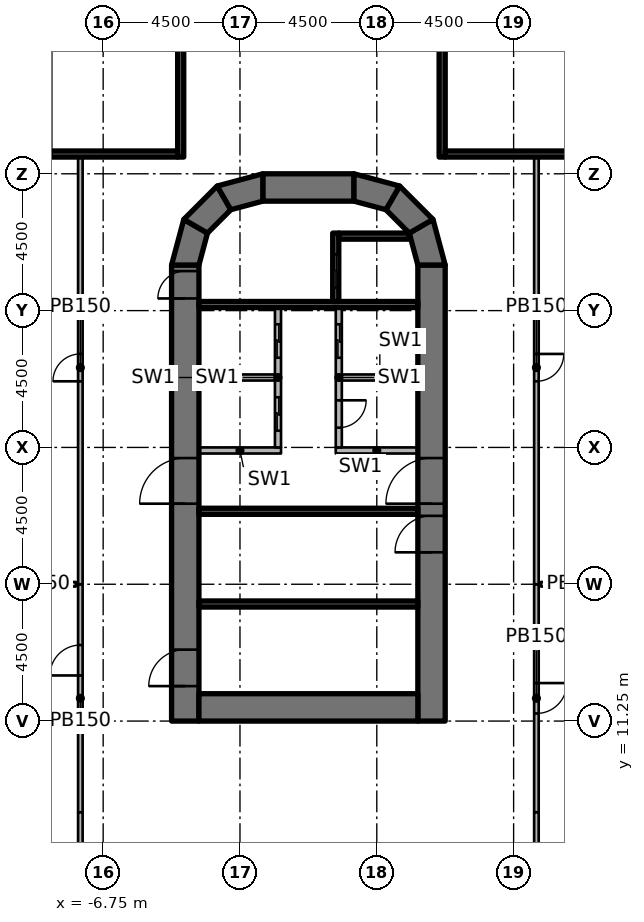
"""IFC4 building model, lengths in metres.
Left out: names, types, materials, properties, quantities, classifications, styles, units other than length and angle.
Written with IfcOpenShell. Run it as: python <this file> out.ifc"""

import sys

from ifc_helpers import new_model, si_unit, direction, frame, frame_2d, origin, origin_2d, place, context, subcontext, project, spatial, polyline, rectangle, outline, extrude, element, fill, save


model = new_model("IFC4")
c1 = context("Model", 3, precision=1e-05, world=origin(), true_north=direction((0.0, 1.0)))
c2 = subcontext(c1, "Body", "Model", "MODEL_VIEW")
j1 = project(units=[si_unit("LENGTHUNIT", "METRE"), si_unit("PLANEANGLEUNIT", "RADIAN")], contexts=[c1])
p1 = place(None, origin())
s1 = spatial("IfcSite", under=j1, at=p1, CompositionType="ELEMENT")
p2 = place(p1, origin())
s2 = spatial("IfcBuilding", under=s1, at=p2, CompositionType="ELEMENT")
p3 = place(p2, frame((0.0, 0.0, 22.0)))
s3 = spatial("IfcBuildingStorey", under=s2, at=p3, CompositionType="ELEMENT", Elevation=22.0)
for number, where, z_axis, x_axis in (
    (1, (-6.25, 10.75, 0.0), (0.0, 0.0, 1.0), (1.0, 0.0, 0.0)),
    (2, (-6.25, 15.75, 0.0), (0.0, 0.0, 1.0), (1.0, 0.0, 0.0)),
    (3, (-6.25, 20.25, 0.0), (0.0, 0.0, 1.0), (1.0, 0.0, 0.0)),
    (4, (-6.25, 24.65, 0.0), (0.0, 0.0, 1.0), (1.0, 0.0, 0.0)),
    (5, (-6.25, 26.7, 0.0), (0.0, 0.0, 1.0), (1.0, 0.0, 0.0)),
    (6, (-2.25, 33.11, 0.0), (0.0, 0.0, 1.0), (1.0, 0.0, 0.0)),
    (7, (2.25, 33.11, 0.0), (0.0, 0.0, 1.0), (1.0, 0.0, 0.0)),
    (8, (6.25, 10.75, 0.0), (0.0, 0.0, 1.0), (1.0, 0.0, 0.0)),
    (9, (6.25, 15.75, 0.0), (0.0, 0.0, 1.0), (1.0, 0.0, 0.0)),
    (10, (6.25, 20.25, 0.0), (0.0, 0.0, 1.0), (1.0, 0.0, 0.0)),
    (11, (6.25, 24.65, 0.0), (0.0, 0.0, 1.0), (1.0, 0.0, 0.0)),
    (12, (6.25, 26.7, 0.0), (0.0, 0.0, 1.0), (1.0, 0.0, 0.0)),
):
    element("IfcColumn", number, at=place(p3, frame(where, z_axis=z_axis, x_axis=x_axis)), inside=s3, PredefinedType="COLUMN", context=c2, shape_type="SweptSolid", body=[
        extrude(rectangle(XDim=1.2, YDim=1.2, at=origin_2d()), origin(), (0.0, 0.0, 1.0), 4.85),
    ])
p4 = place(p3, frame((-4.05, 11.25, 0.0), z_axis=(0.0, 0.0, 1.0), x_axis=(0.0, 1.0, 0.0)))
e13 = element("IfcWall", 13, at=p4, inside=s3, PredefinedType="SHEAR", context=c2, shape_type="SweptSolid", body=[
    extrude(rectangle(XDim=15.0, YDim=0.9, at=frame_2d((7.5, 0.0))), origin(), (0.0, 0.0, 1.0), 5.0),
])
p5 = place(p4, frame((7.15, 0.0, 0.0)))
e14 = element("IfcOpeningElement", 14, at=p5, cuts=e13, PredefinedType="OPENING", context=c2, shape_type="SweptSolid", body=[
    extrude(rectangle(XDim=1.5, YDim=2.3, at=frame_2d((0.75, 1.15))), frame((0.0, 0.46, 0.0), z_axis=(0.0, -1.0, 0.0), x_axis=(1.0, 0.0, 0.0)), (0.0, 0.0, 1.0), 0.92),
])
p6 = place(p4, frame((13.9, 0.0, 0.0)))
e15 = element("IfcOpeningElement", 15, at=p6, cuts=e13, PredefinedType="OPENING", context=c2, shape_type="SweptSolid", body=[
    extrude(rectangle(XDim=0.9, YDim=2.1, at=frame_2d((0.45, 1.05))), frame((0.0, 0.46, 0.0), z_axis=(0.0, -1.0, 0.0), x_axis=(1.0, 0.0, 0.0)), (0.0, 0.0, 1.0), 0.92),
])
p7 = place(p4, frame((1.15, 0.0, 0.0)))
e16 = element("IfcOpeningElement", 16, at=p7, cuts=e13, PredefinedType="OPENING", context=c2, shape_type="SweptSolid", body=[
    extrude(rectangle(XDim=1.2, YDim=2.1, at=frame_2d((0.6, 1.05))), frame((0.0, 0.46, 0.0), z_axis=(0.0, -1.0, 0.0), x_axis=(1.0, 0.0, 0.0)), (0.0, 0.0, 1.0), 0.92),
])
p8 = place(p3, frame((4.05, 11.25, 0.0), z_axis=(0.0, 0.0, 1.0), x_axis=(0.0, 1.0, 0.0)))
e17 = element("IfcWall", 17, at=p8, inside=s3, PredefinedType="SHEAR", context=c2, shape_type="SweptSolid", body=[
    extrude(rectangle(XDim=15.0, YDim=0.9, at=frame_2d((7.5, 0.0))), origin(), (0.0, 0.0, 1.0), 5.0),
])
p9 = place(p8, frame((7.15, 0.0, 0.0)))
e18 = element("IfcOpeningElement", 18, at=p9, cuts=e17, PredefinedType="OPENING", context=c2, shape_type="SweptSolid", body=[
    extrude(rectangle(XDim=1.5, YDim=2.3, at=frame_2d((0.75, 1.15))), frame((0.0, 0.46, 0.0), z_axis=(0.0, -1.0, 0.0), x_axis=(1.0, 0.0, 0.0)), (0.0, 0.0, 1.0), 0.92),
])
p10 = place(p8, frame((5.55, 0.0, 0.0)))
e19 = element("IfcOpeningElement", 19, at=p10, cuts=e17, PredefinedType="OPENING", context=c2, shape_type="SweptSolid", body=[
    extrude(rectangle(XDim=1.2, YDim=2.1, at=frame_2d((0.6, 1.05))), frame((0.0, 0.46, 0.0), z_axis=(0.0, -1.0, 0.0), x_axis=(1.0, 0.0, 0.0)), (0.0, 0.0, 1.0), 0.92),
])
p11 = place(p3, frame((-3.6, 11.7, 0.0), z_axis=(0.0, 0.0, 1.0), x_axis=(1.0, 0.0, 0.0)))
e20 = element("IfcWall", 20, at=p11, inside=s3, PredefinedType="SHEAR", context=c2, shape_type="SweptSolid", body=[
    extrude(rectangle(XDim=7.2, YDim=0.9, at=frame_2d((3.6, 0.0))), origin(), (0.0, 0.0, 1.0), 5.0),
])
p12 = place(p3, frame((-1.5, 28.8, 0.0), z_axis=(0.0, 0.0, 1.0), x_axis=(1.0, 0.0, 0.0)))
e21 = element("IfcWall", 21, at=p12, inside=s3, PredefinedType="SHEAR", context=c2, shape_type="SweptSolid", body=[
    extrude(rectangle(XDim=3.0, YDim=0.9, at=frame_2d((1.5, 0.0))), origin(), (0.0, 0.0, 1.0), 5.0),
])
p13 = place(p3, origin())
e22 = element("IfcWall", 22, at=p13, inside=s3, PredefinedType="SHEAR", context=c2, shape_type="SweptSolid", body=[
    extrude(outline(polyline([(-4.5, 26.25), (-4.098, 27.75), (-3.319, 27.3), (-3.6, 26.25), (-4.5, 26.25)])), origin(), (0.0, 0.0, 1.0), 5.0),
])
p14 = place(p3, origin())
e23 = element("IfcWall", 23, at=p14, inside=s3, PredefinedType="SHEAR", context=c2, shape_type="SweptSolid", body=[
    extrude(outline(polyline([(-4.098, 27.75), (-3.0, 28.848), (-2.55, 28.069), (-3.319, 27.3), (-4.098, 27.75)])), origin(), (0.0, 0.0, 1.0), 5.0),
])
p15 = place(p3, origin())
e24 = element("IfcWall", 24, at=p15, inside=s3, PredefinedType="SHEAR", context=c2, shape_type="SweptSolid", body=[
    extrude(outline(polyline([(-3.0, 28.848), (-1.5, 29.25), (-1.5, 28.35), (-2.55, 28.069), (-3.0, 28.848)])), origin(), (0.0, 0.0, 1.0), 5.0),
])
p16 = place(p3, origin())
e25 = element("IfcWall", 25, at=p16, inside=s3, PredefinedType="SHEAR", context=c2, shape_type="SweptSolid", body=[
    extrude(outline(polyline([(4.5, 26.25), (4.098, 27.75), (3.319, 27.3), (3.6, 26.25), (4.5, 26.25)])), origin(), (0.0, 0.0, 1.0), 5.0),
])
p17 = place(p3, origin())
e26 = element("IfcWall", 26, at=p17, inside=s3, PredefinedType="SHEAR", context=c2, shape_type="SweptSolid", body=[
    extrude(outline(polyline([(4.098, 27.75), (3.0, 28.848), (2.55, 28.069), (3.319, 27.3), (4.098, 27.75)])), origin(), (0.0, 0.0, 1.0), 5.0),
])
p18 = place(p3, origin())
e27 = element("IfcWall", 27, at=p18, inside=s3, PredefinedType="SHEAR", context=c2, shape_type="SweptSolid", body=[
    extrude(outline(polyline([(3.0, 28.848), (1.5, 29.25), (1.5, 28.35), (2.55, 28.069), (3.0, 28.848)])), origin(), (0.0, 0.0, 1.0), 5.0),
])
p19 = place(p3, frame((-3.6, 24.95, 0.0), z_axis=(0.0, 0.0, 1.0), x_axis=(1.0, 0.0, 0.0)))
e28 = element("IfcWall", 28, at=p19, inside=s3, PredefinedType="SHEAR", context=c2, shape_type="SweptSolid", body=[
    extrude(rectangle(XDim=7.2, YDim=0.2, at=frame_2d((3.6, 0.0))), origin(), (0.0, 0.0, 1.0), 4.85),
])
p20 = place(p3, frame((0.9, 27.3, 0.0), z_axis=(0.0, 0.0, 1.0), x_axis=(0.0, -1.0, 0.0)))
e29 = element("IfcWall", 29, at=p20, inside=s3, PredefinedType="SHEAR", context=c2, shape_type="SweptSolid", body=[
    extrude(rectangle(XDim=2.25, YDim=0.2, at=frame_2d((1.125, 0.0))), origin(), (0.0, 0.0, 1.0), 4.85),
])
p21 = place(p20, frame((0.7, 0.0, 0.0)))
e30 = element("IfcOpeningElement", 30, at=p21, cuts=e29, PredefinedType="OPENING", context=c2, shape_type="SweptSolid", body=[
    extrude(rectangle(XDim=1.1, YDim=2.3, at=frame_2d((0.55, 1.15))), frame((0.0, 0.11, 0.0), z_axis=(0.0, -1.0, 0.0), x_axis=(1.0, 0.0, 0.0)), (0.0, 0.0, 1.0), 0.22),
])
p22 = place(p3, origin())
e31 = element("IfcWall", 31, at=p22, inside=s3, PredefinedType="SHEAR", context=c2, shape_type="SweptSolid", body=[
    extrude(outline(polyline([(1.0, 27.1), (3.341, 27.1), (3.291, 27.284), (3.275, 27.3), (1.0, 27.3), (1.0, 27.1)])), origin(), (0.0, 0.0, 1.0), 4.85),
])
for number, where, z_axis, x_axis in (
    (32, (-3.6, 18.15, 0.0), (0.0, 0.0, 1.0), (1.0, 0.0, 0.0)),
    (33, (-3.6, 15.1, 0.0), (0.0, 0.0, 1.0), (1.0, 0.0, 0.0)),
):
    element("IfcWall", number, at=place(p3, frame(where, z_axis=z_axis, x_axis=x_axis)), inside=s3, PredefinedType="SHEAR", context=c2, shape_type="SweptSolid", body=[
        extrude(rectangle(XDim=7.2, YDim=0.2, at=frame_2d((3.6, 0.0))), origin(), (0.0, 0.0, 1.0), 4.85),
    ])
p23 = place(p3, frame((-3.6, 20.15, 0.0), z_axis=(0.0, 0.0, 1.0), x_axis=(1.0, 0.0, 0.0)))
e34 = element("IfcWall", 34, at=p23, inside=s3, PredefinedType="PARTITIONING", context=c2, shape_type="SweptSolid", body=[
    extrude(rectangle(XDim=2.7, YDim=0.2, at=frame_2d((1.35, 0.0))), origin(), (0.0, 0.0, 1.0), 4.85),
])
p24 = place(p3, frame((-1.0, 24.85, 0.0), z_axis=(0.0, 0.0, 1.0), x_axis=(0.0, -1.0, 0.0)))
e35 = element("IfcWall", 35, at=p24, inside=s3, PredefinedType="PARTITIONING", context=c2, shape_type="SweptSolid", body=[
    extrude(rectangle(XDim=4.6, YDim=0.2, at=frame_2d((2.3, 0.0))), origin(), (0.0, 0.0, 1.0), 4.85),
])
p25 = place(p24, frame((0.55, 0.0, 0.0)))
e36 = element("IfcOpeningElement", 36, at=p25, cuts=e35, PredefinedType="OPENING", context=c2, shape_type="SweptSolid", body=[
    extrude(rectangle(XDim=1.1, YDim=2.3, at=frame_2d((0.55, 1.15))), frame((0.0, 0.11, 0.0), z_axis=(0.0, -1.0, 0.0), x_axis=(1.0, 0.0, 0.0)), (0.0, 0.0, 1.0), 0.22),
])
p26 = place(p24, frame((2.95, 0.0, 0.0)))
e37 = element("IfcOpeningElement", 37, at=p26, cuts=e35, PredefinedType="OPENING", context=c2, shape_type="SweptSolid", body=[
    extrude(rectangle(XDim=1.1, YDim=2.3, at=frame_2d((0.55, 1.15))), frame((0.0, 0.11, 0.0), z_axis=(0.0, -1.0, 0.0), x_axis=(1.0, 0.0, 0.0)), (0.0, 0.0, 1.0), 0.22),
])
p27 = place(p3, frame((0.9, 20.15, 0.0), z_axis=(0.0, 0.0, 1.0), x_axis=(1.0, 0.0, 0.0)))
e38 = element("IfcWall", 38, at=p27, inside=s3, PredefinedType="PARTITIONING", context=c2, shape_type="SweptSolid", body=[
    extrude(rectangle(XDim=2.7, YDim=0.2, at=frame_2d((1.35, 0.0))), origin(), (0.0, 0.0, 1.0), 4.85),
])
p28 = place(p3, frame((1.0, 24.85, 0.0), z_axis=(0.0, 0.0, 1.0), x_axis=(0.0, -1.0, 0.0)))
e39 = element("IfcWall", 39, at=p28, inside=s3, PredefinedType="PARTITIONING", context=c2, shape_type="SweptSolid", body=[
    extrude(rectangle(XDim=4.6, YDim=0.2, at=frame_2d((2.3, 0.0))), origin(), (0.0, 0.0, 1.0), 4.85),
])
p29 = place(p28, frame((0.55, 0.0, 0.0)))
e40 = element("IfcOpeningElement", 40, at=p29, cuts=e39, PredefinedType="OPENING", context=c2, shape_type="SweptSolid", body=[
    extrude(rectangle(XDim=1.1, YDim=2.3, at=frame_2d((0.55, 1.15))), frame((0.0, 0.11, 0.0), z_axis=(0.0, -1.0, 0.0), x_axis=(1.0, 0.0, 0.0)), (0.0, 0.0, 1.0), 0.22),
])
p30 = place(p28, frame((3.05, 0.0, 0.0)))
e41 = element("IfcOpeningElement", 41, at=p30, cuts=e39, PredefinedType="OPENING", context=c2, shape_type="SweptSolid", body=[
    extrude(rectangle(XDim=0.9, YDim=2.1, at=frame_2d((0.45, 1.05))), frame((0.0, 0.11, 0.0), z_axis=(0.0, -1.0, 0.0), x_axis=(1.0, 0.0, 0.0)), (0.0, 0.0, 1.0), 0.22),
])
for number, where, z_axis, x_axis in (
    (42, (-3.6, 22.55, 0.0), (0.0, 0.0, 1.0), (1.0, 0.0, 0.0)),
    (43, (1.1, 22.55, 0.0), (0.0, 0.0, 1.0), (1.0, 0.0, 0.0)),
):
    element("IfcWall", number, at=place(p3, frame(where, z_axis=z_axis, x_axis=x_axis)), inside=s3, PredefinedType="PARTITIONING", context=c2, shape_type="SweptSolid", body=[
        extrude(rectangle(XDim=2.5, YDim=0.2, at=frame_2d((1.25, 0.0))), origin(), (0.0, 0.0, 1.0), 4.85),
    ])
p31 = place(p3, frame((-4.2, 29.8, 0.0), z_axis=(0.0, 0.0, 1.0), x_axis=(0.0, 1.0, 0.0)))
e44 = element("IfcWall", 44, at=p31, inside=s3, PredefinedType="SHEAR", context=c2, shape_type="SweptSolid", body=[
    extrude(rectangle(XDim=8.0, YDim=0.2, at=frame_2d((4.0, 0.0))), origin(), (0.0, 0.0, 1.0), 4.55),
])
p32 = place(p31, frame((6.3, 0.0, 0.0)))
e45 = element("IfcOpeningElement", 45, at=p32, cuts=e44, PredefinedType="OPENING", context=c2, shape_type="SweptSolid", body=[
    extrude(rectangle(XDim=1.2, YDim=2.1, at=frame_2d((0.6, 1.05))), frame((0.0, 0.11, 0.0), z_axis=(0.0, -1.0, 0.0), x_axis=(1.0, 0.0, 0.0)), (0.0, 0.0, 1.0), 0.22),
])
p33 = place(p3, frame((-8.5, 29.9, 0.0), z_axis=(0.0, 0.0, 1.0), x_axis=(1.0, 0.0, 0.0)))
e46 = element("IfcWall", 46, at=p33, inside=s3, PredefinedType="SHEAR", context=c2, shape_type="SweptSolid", body=[
    extrude(rectangle(XDim=4.2, YDim=0.2, at=frame_2d((2.1, 0.0))), origin(), (0.0, 0.0, 1.0), 4.55),
])
p34 = place(p3, frame((4.4, 29.8, 0.0), z_axis=(0.0, 0.0, 1.0), x_axis=(0.0, 1.0, 0.0)))
e47 = element("IfcWall", 47, at=p34, inside=s3, PredefinedType="SHEAR", context=c2, shape_type="SweptSolid", body=[
    extrude(rectangle(XDim=8.0, YDim=0.2, at=frame_2d((4.0, 0.0))), origin(), (0.0, 0.0, 1.0), 4.55),
])
p35 = place(p34, frame((6.3, 0.0, 0.0)))
e48 = element("IfcOpeningElement", 48, at=p35, cuts=e47, PredefinedType="OPENING", context=c2, shape_type="SweptSolid", body=[
    extrude(rectangle(XDim=1.2, YDim=2.1, at=frame_2d((0.6, 1.05))), frame((0.0, 0.11, 0.0), z_axis=(0.0, -1.0, 0.0), x_axis=(1.0, 0.0, 0.0)), (0.0, 0.0, 1.0), 0.22),
])
p36 = place(p3, frame((4.5, 29.9, 0.0), z_axis=(0.0, 0.0, 1.0), x_axis=(1.0, 0.0, 0.0)))
e49 = element("IfcWall", 49, at=p36, inside=s3, PredefinedType="SHEAR", context=c2, shape_type="SweptSolid", body=[
    extrude(rectangle(XDim=4.2, YDim=0.2, at=frame_2d((2.1, 0.0))), origin(), (0.0, 0.0, 1.0), 4.55),
])
p37 = place(p3, frame((7.5, 15.75, 0.0), z_axis=(0.0, 0.0, 1.0), x_axis=(0.0, -1.0, 0.0)))
e50 = element("IfcWall", 50, at=p37, inside=s3, PredefinedType="PARTITIONING", context=c2, shape_type="SweptSolid", body=[
    extrude(rectangle(XDim=7.5, YDim=0.15, at=frame_2d((3.75, 0.0))), origin(), (0.0, 0.0, 1.0), 3.93),
])
p38 = place(p37, frame((3.25, 0.0, 0.0)))
e51 = element("IfcOpeningElement", 51, at=p38, cuts=e50, PredefinedType="OPENING", context=c2, shape_type="SweptSolid", body=[
    extrude(rectangle(XDim=1.0, YDim=2.1, at=frame_2d((0.5, 1.05))), frame((0.0, 0.085, 0.0), z_axis=(0.0, -1.0, 0.0), x_axis=(1.0, 0.0, 0.0)), (0.0, 0.0, 1.0), 0.17),
])
p39 = place(p3, frame((7.5, 30.0, 0.0), z_axis=(0.0, 0.0, 1.0), x_axis=(0.0, -1.0, 0.0)))
e52 = element("IfcWall", 52, at=p39, inside=s3, PredefinedType="PARTITIONING", context=c2, shape_type="SweptSolid", body=[
    extrude(rectangle(XDim=14.25, YDim=0.15, at=frame_2d((7.125, 0.0))), origin(), (0.0, 0.0, 1.0), 4.55),
])
p40 = place(p39, frame((6.675, 0.0, 0.0)))
e53 = element("IfcOpeningElement", 53, at=p40, cuts=e52, PredefinedType="OPENING", context=c2, shape_type="SweptSolid", body=[
    extrude(rectangle(XDim=0.9, YDim=2.1, at=frame_2d((0.45, 1.05))), frame((0.0, 0.085, 0.0), z_axis=(0.0, -1.0, 0.0), x_axis=(1.0, 0.0, 0.0)), (0.0, 0.0, 1.0), 0.17),
])
p41 = place(p3, frame((-7.5, 8.25, 0.0), z_axis=(0.0, 0.0, 1.0), x_axis=(0.0, 1.0, 0.0)))
e54 = element("IfcWall", 54, at=p41, inside=s3, PredefinedType="PARTITIONING", context=c2, shape_type="SweptSolid", body=[
    extrude(rectangle(XDim=7.5, YDim=0.15, at=frame_2d((3.75, 0.0))), origin(), (0.0, 0.0, 1.0), 3.93),
])
p42 = place(p41, frame((4.5, 0.0, 0.0)))
e55 = element("IfcOpeningElement", 55, at=p42, cuts=e54, PredefinedType="OPENING", context=c2, shape_type="SweptSolid", body=[
    extrude(rectangle(XDim=1.0, YDim=2.1, at=frame_2d((0.5, 1.05))), frame((0.0, 0.085, 0.0), z_axis=(0.0, -1.0, 0.0), x_axis=(1.0, 0.0, 0.0)), (0.0, 0.0, 1.0), 0.17),
])
p43 = place(p3, frame((-7.5, 15.75, 0.0), z_axis=(0.0, 0.0, 1.0), x_axis=(0.0, 1.0, 0.0)))
e56 = element("IfcWall", 56, at=p43, inside=s3, PredefinedType="PARTITIONING", context=c2, shape_type="SweptSolid", body=[
    extrude(rectangle(XDim=14.25, YDim=0.15, at=frame_2d((7.125, 0.0))), origin(), (0.0, 0.0, 1.0), 4.55),
])
p44 = place(p43, frame((6.675, 0.0, 0.0)))
e57 = element("IfcOpeningElement", 57, at=p44, cuts=e56, PredefinedType="OPENING", context=c2, shape_type="SweptSolid", body=[
    extrude(rectangle(XDim=0.9, YDim=2.1, at=frame_2d((0.45, 1.05))), frame((0.0, 0.085, 0.0), z_axis=(0.0, -1.0, 0.0), x_axis=(1.0, 0.0, 0.0)), (0.0, 0.0, 1.0), 0.17),
])
p45 = place(p3, frame((7.65, 15.75, 0.0), z_axis=(0.0, 0.0, 1.0), x_axis=(1.0, 0.0, 0.0)))
e58 = element("IfcWall", 58, at=p45, inside=s3, PredefinedType="PARTITIONING", context=c2, shape_type="SweptSolid", body=[
    extrude(rectangle(XDim=2.4, YDim=0.15, at=frame_2d((1.2, 0.0))), origin(), (0.0, 0.0, 1.0), 4.55),
])
p46 = place(p3, frame((7.5, 1.65, 0.0), z_axis=(0.0, 0.0, 1.0), x_axis=(0.0, 1.0, 0.0)))
e59 = element("IfcWall", 59, at=p46, inside=s3, PredefinedType="PARTITIONING", context=c2, shape_type="SweptSolid", body=[
    extrude(rectangle(XDim=6.6, YDim=0.15, at=frame_2d((3.3, 0.0))), origin(), (0.0, 0.0, 1.0), 3.911),
])
p47 = place(p3, frame((-10.05, 15.75, 0.0), z_axis=(0.0, 0.0, 1.0), x_axis=(1.0, 0.0, 0.0)))
e60 = element("IfcWall", 60, at=p47, inside=s3, PredefinedType="PARTITIONING", context=c2, shape_type="SweptSolid", body=[
    extrude(rectangle(XDim=2.4, YDim=0.15, at=frame_2d((1.2, 0.0))), origin(), (0.0, 0.0, 1.0), 4.55),
])
p48 = place(p3, frame((-7.5, 8.25, 0.0), z_axis=(0.0, 0.0, 1.0), x_axis=(0.0, -1.0, 0.0)))
e61 = element("IfcWall", 61, at=p48, inside=s3, PredefinedType="PARTITIONING", context=c2, shape_type="SweptSolid", body=[
    extrude(rectangle(XDim=6.6, YDim=0.15, at=frame_2d((3.3, 0.0))), origin(), (0.0, 0.0, 1.0), 3.911),
])
p49 = place(p5, origin())
e62 = element("IfcDoor", 62, at=p49, inside=s3, OperationType="DOUBLE_DOOR_SINGLE_SWING", PredefinedType="DOOR", context=c2, shape_type="SweptSolid", body=[
    extrude(rectangle(XDim=1.5, YDim=2.3, at=frame_2d((0.75, 1.15))), frame((0.0, 0.025, 0.0), z_axis=(0.0, -1.0, 0.0), x_axis=(1.0, 0.0, 0.0)), (0.0, 0.0, 1.0), 0.05),
])
fill(e14, e62)
p50 = place(p9, origin())
e63 = element("IfcDoor", 63, at=p50, inside=s3, OperationType="DOUBLE_DOOR_SINGLE_SWING", PredefinedType="DOOR", context=c2, shape_type="SweptSolid", body=[
    extrude(rectangle(XDim=1.5, YDim=2.3, at=frame_2d((0.75, 1.15))), frame((0.0, 0.025, 0.0), z_axis=(0.0, -1.0, 0.0), x_axis=(1.0, 0.0, 0.0)), (0.0, 0.0, 1.0), 0.05),
])
fill(e18, e63)
p51 = place(p6, origin())
e64 = element("IfcDoor", 64, at=p51, inside=s3, OperationType="SINGLE_SWING_RIGHT", PredefinedType="DOOR", context=c2, shape_type="SweptSolid", body=[
    extrude(rectangle(XDim=0.9, YDim=2.1, at=frame_2d((0.45, 1.05))), frame((0.0, 0.025, 0.0), z_axis=(0.0, -1.0, 0.0), x_axis=(1.0, 0.0, 0.0)), (0.0, 0.0, 1.0), 0.05),
])
fill(e15, e64)
p52 = place(p10, origin())
e65 = element("IfcDoor", 65, at=p52, inside=s3, OperationType="SINGLE_SWING_RIGHT", PredefinedType="DOOR", context=c2, shape_type="SweptSolid", body=[
    extrude(rectangle(XDim=1.2, YDim=2.1, at=frame_2d((0.6, 1.05))), frame((0.0, 0.025, 0.0), z_axis=(0.0, -1.0, 0.0), x_axis=(1.0, 0.0, 0.0)), (0.0, 0.0, 1.0), 0.05),
])
fill(e19, e65)
p53 = place(p7, origin())
e66 = element("IfcDoor", 66, at=p53, inside=s3, OperationType="SINGLE_SWING_RIGHT", PredefinedType="DOOR", context=c2, shape_type="SweptSolid", body=[
    extrude(rectangle(XDim=1.2, YDim=2.1, at=frame_2d((0.6, 1.05))), frame((0.0, 0.025, 0.0), z_axis=(0.0, -1.0, 0.0), x_axis=(1.0, 0.0, 0.0)), (0.0, 0.0, 1.0), 0.05),
])
fill(e16, e66)
p54 = place(p21, origin())
e67 = element("IfcDoor", 67, at=p54, inside=s3, OperationType="DOUBLE_DOOR_SLIDING", PredefinedType="DOOR", context=c2, shape_type="SweptSolid", body=[
    extrude(rectangle(XDim=1.1, YDim=2.3, at=frame_2d((0.55, 1.15))), frame((0.0, 0.025, 0.0), z_axis=(0.0, -1.0, 0.0), x_axis=(1.0, 0.0, 0.0)), (0.0, 0.0, 1.0), 0.05),
])
fill(e30, e67)
p55 = place(p25, origin())
e68 = element("IfcDoor", 68, at=p55, inside=s3, OperationType="DOUBLE_DOOR_SLIDING", PredefinedType="DOOR", context=c2, shape_type="SweptSolid", body=[
    extrude(rectangle(XDim=1.1, YDim=2.3, at=frame_2d((0.55, 1.15))), frame((0.0, 0.025, 0.0), z_axis=(0.0, -1.0, 0.0), x_axis=(1.0, 0.0, 0.0)), (0.0, 0.0, 1.0), 0.05),
])
fill(e36, e68)
p56 = place(p26, origin())
e69 = element("IfcDoor", 69, at=p56, inside=s3, OperationType="DOUBLE_DOOR_SLIDING", PredefinedType="DOOR", context=c2, shape_type="SweptSolid", body=[
    extrude(rectangle(XDim=1.1, YDim=2.3, at=frame_2d((0.55, 1.15))), frame((0.0, 0.025, 0.0), z_axis=(0.0, -1.0, 0.0), x_axis=(1.0, 0.0, 0.0)), (0.0, 0.0, 1.0), 0.05),
])
fill(e37, e69)
p57 = place(p29, origin())
e70 = element("IfcDoor", 70, at=p57, inside=s3, OperationType="DOUBLE_DOOR_SLIDING", PredefinedType="DOOR", context=c2, shape_type="SweptSolid", body=[
    extrude(rectangle(XDim=1.1, YDim=2.3, at=frame_2d((0.55, 1.15))), frame((0.0, 0.025, 0.0), z_axis=(0.0, -1.0, 0.0), x_axis=(1.0, 0.0, 0.0)), (0.0, 0.0, 1.0), 0.05),
])
fill(e40, e70)
p58 = place(p30, origin())
e71 = element("IfcDoor", 71, at=p58, inside=s3, OperationType="SINGLE_SWING_RIGHT", PredefinedType="DOOR", context=c2, shape_type="SweptSolid", body=[
    extrude(rectangle(XDim=0.9, YDim=2.1, at=frame_2d((0.45, 1.05))), frame((0.0, 0.025, 0.0), z_axis=(0.0, -1.0, 0.0), x_axis=(1.0, 0.0, 0.0)), (0.0, 0.0, 1.0), 0.05),
])
fill(e41, e71)
p59 = place(p38, origin())
e72 = element("IfcDoor", 72, at=p59, inside=s3, OperationType="SINGLE_SWING_LEFT", PredefinedType="DOOR", context=c2, shape_type="SweptSolid", body=[
    extrude(rectangle(XDim=1.0, YDim=2.1, at=frame_2d((0.5, 1.05))), frame((0.0, 0.025, 0.0), z_axis=(0.0, -1.0, 0.0), x_axis=(1.0, 0.0, 0.0)), (0.0, 0.0, 1.0), 0.05),
])
fill(e51, e72)
p60 = place(p40, origin())
e73 = element("IfcDoor", 73, at=p60, inside=s3, OperationType="SINGLE_SWING_LEFT", PredefinedType="DOOR", context=c2, shape_type="SweptSolid", body=[
    extrude(rectangle(XDim=0.9, YDim=2.1, at=frame_2d((0.45, 1.05))), frame((0.0, 0.025, 0.0), z_axis=(0.0, -1.0, 0.0), x_axis=(1.0, 0.0, 0.0)), (0.0, 0.0, 1.0), 0.05),
])
fill(e53, e73)
p61 = place(p42, origin())
e74 = element("IfcDoor", 74, at=p61, inside=s3, OperationType="SINGLE_SWING_LEFT", PredefinedType="DOOR", context=c2, shape_type="SweptSolid", body=[
    extrude(rectangle(XDim=1.0, YDim=2.1, at=frame_2d((0.5, 1.05))), frame((0.0, 0.025, 0.0), z_axis=(0.0, -1.0, 0.0), x_axis=(1.0, 0.0, 0.0)), (0.0, 0.0, 1.0), 0.05),
])
fill(e55, e74)
p62 = place(p44, origin())
e75 = element("IfcDoor", 75, at=p62, inside=s3, OperationType="SINGLE_SWING_LEFT", PredefinedType="DOOR", context=c2, shape_type="SweptSolid", body=[
    extrude(rectangle(XDim=0.9, YDim=2.1, at=frame_2d((0.45, 1.05))), frame((0.0, 0.025, 0.0), z_axis=(0.0, -1.0, 0.0), x_axis=(1.0, 0.0, 0.0)), (0.0, 0.0, 1.0), 0.05),
])
fill(e57, e75)
save(model, sys.argv[1])
